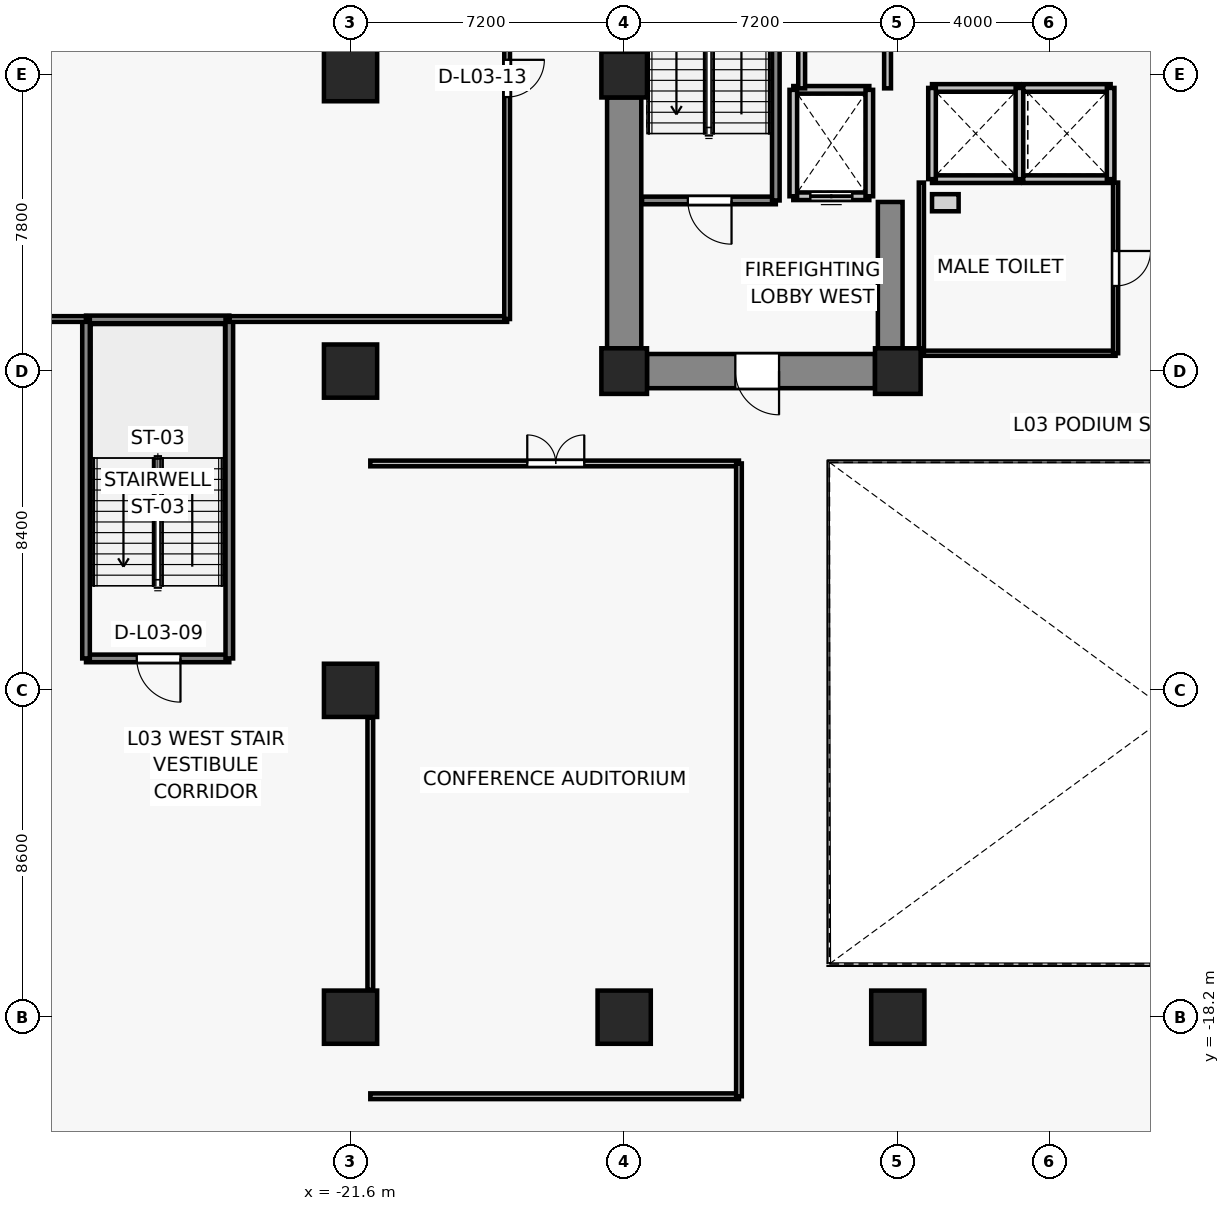
"""IFC4 building model, lengths in metres.
Left out: names, types, materials, properties, quantities, classifications, styles, units other than length and angle.
Written with IfcOpenShell. Run it as: python <this file> out.ifc"""

import sys

from ifc_helpers import new_model, si_unit, direction, frame, frame_2d, origin, origin_2d, place, context, subcontext, project, spatial, rectangle, extrude, source, transform, mapped, element, fill, save


model = new_model("IFC4")
c1 = context("Model", 3, precision=1e-05, world=origin(), true_north=direction((0.0, 1.0)))
c2 = subcontext(c1, "Body", "Model", "MODEL_VIEW")
j1 = project(units=[si_unit("LENGTHUNIT", "METRE"), si_unit("PLANEANGLEUNIT", "RADIAN")], contexts=[c1])
p1 = place(None, origin())
s1 = spatial("IfcSite", under=j1, at=p1, CompositionType="ELEMENT")
p2 = place(p1, origin())
s2 = spatial("IfcBuilding", under=s1, at=p2, CompositionType="ELEMENT")
p3 = place(p2, frame((0.0, 0.0, 13.8)))
s3 = spatial("IfcBuildingStorey", under=s2, at=p3, CompositionType="ELEMENT", Elevation=13.8)
for number, where, z_axis, x_axis in (
    (1, (-14.4, -1.2, 0.0), (0.0, 0.0, 1.0), (1.0, 0.0, 0.0)),
    (2, (-7.2, -1.2, 0.0), (0.0, 0.0, 1.0), (1.0, 0.0, 0.0)),
    (3, (-14.4, 6.6, 0.0), (0.0, 0.0, 1.0), (1.0, 0.0, 0.0)),
):
    element("IfcColumn", number, at=place(p3, frame(where, z_axis=z_axis, x_axis=x_axis)), inside=s3, PredefinedType="COLUMN", context=c2, shape_type="SweptSolid", body=[
        extrude(rectangle(XDim=1.2, YDim=1.2, at=origin_2d()), origin(), (0.0, 0.0, 1.0), 4.4),
    ])
for number, where, z_axis, x_axis in (
    (4, (-21.6, -18.2, 0.0), (0.0, 0.0, 1.0), (1.0, 0.0, 0.0)),
    (5, (-14.4, -18.2, 0.0), (0.0, 0.0, 1.0), (1.0, 0.0, 0.0)),
    (6, (-7.2, -18.2, 0.0), (0.0, 0.0, 1.0), (1.0, 0.0, 0.0)),
    (7, (-21.6, -9.6, 0.0), (0.0, 0.0, 1.0), (1.0, 0.0, 0.0)),
    (8, (-21.6, -1.2, 0.0), (0.0, 0.0, 1.0), (1.0, 0.0, 0.0)),
    (9, (-21.6, 6.6, 0.0), (0.0, 0.0, 1.0), (1.0, 0.0, 0.0)),
):
    element("IfcColumn", number, at=place(p3, frame(where, z_axis=z_axis, x_axis=x_axis)), inside=s3, PredefinedType="COLUMN", context=c2, shape_type="SweptSolid", body=[
        extrude(rectangle(XDim=1.4, YDim=1.4, at=origin_2d()), origin(), (0.0, 0.0, 1.0), 4.4),
    ])
p4 = place(p3, frame((-14.4, -0.6, 0.0), z_axis=(0.0, 0.0, 1.0), x_axis=(0.0, 1.0, 0.0)))
e10 = element("IfcWall", 10, at=p4, inside=s3, PredefinedType="SHEAR", context=c2, shape_type="SweptSolid", body=[
    extrude(rectangle(XDim=6.6, YDim=0.9, at=frame_2d((3.3, 0.0))), origin(), (0.0, 0.0, 1.0), 4.1),
])
p5 = place(p3, frame((-7.8, -1.2, 0.0), z_axis=(0.0, 0.0, 1.0), x_axis=(-1.0, 0.0, 0.0)))
e11 = element("IfcWall", 11, at=p5, inside=s3, PredefinedType="SHEAR", context=c2, shape_type="SweptSolid", body=[
    extrude(rectangle(XDim=6.0, YDim=0.9, at=frame_2d((3.0, 0.0))), origin(), (0.0, 0.0, 1.0), 4.1),
])
p6 = place(p5, frame((2.525, 0.0, 0.0)))
e12 = element("IfcOpeningElement", 12, at=p6, cuts=e11, PredefinedType="OPENING", context=c2, shape_type="SweptSolid", body=[
    extrude(rectangle(XDim=1.15, YDim=2.15, at=frame_2d((0.575, 1.075))), frame((0.0, 0.46, 0.0), z_axis=(0.0, -1.0, 0.0), x_axis=(1.0, 0.0, 0.0)), (0.0, 0.0, 1.0), 0.92),
])
p7 = place(p3, frame((-7.4, -0.75, 0.0), z_axis=(0.0, 0.0, 1.0), x_axis=(0.0, 1.0, 0.0)))
e13 = element("IfcWall", 13, at=p7, inside=s3, PredefinedType="SHEAR", context=c2, shape_type="SweptSolid", body=[
    extrude(rectangle(XDim=4.0, YDim=0.65, at=frame_2d((2.0, 0.0))), origin(), (0.0, 0.0, 1.0), 4.1),
])
p8 = place(p3, frame((-7.95, 3.4, 0.0), z_axis=(0.0, 0.0, 1.0), x_axis=(-1.0, 0.0, 0.0)))
e14 = element("IfcWall", 14, at=p8, inside=s3, PredefinedType="SOLIDWALL", context=c2, shape_type="SweptSolid", body=[
    extrude(rectangle(XDim=2.0, YDim=0.2, at=frame_2d((1.0, 0.0))), origin(), (0.0, 0.0, 1.0), 4.1),
])
p9 = place(p8, frame((0.45, 0.0, 0.0)))
e15 = element("IfcOpeningElement", 15, at=p9, cuts=e14, PredefinedType="OPENING", context=c2, shape_type="SweptSolid", body=[
    extrude(rectangle(XDim=1.1, YDim=2.2, at=frame_2d((0.55, 1.1))), frame((0.0, 0.11, 0.0), z_axis=(0.0, -1.0, 0.0), x_axis=(1.0, 0.0, 0.0)), (0.0, 0.0, 1.0), 0.22),
])
p10 = place(p3, frame((-9.95, 6.2, 0.0), z_axis=(0.0, 0.0, 1.0), x_axis=(1.0, 0.0, 0.0)))
e16 = element("IfcWall", 16, at=p10, inside=s3, PredefinedType="SOLIDWALL", context=c2, shape_type="SweptSolid", body=[
    extrude(rectangle(XDim=2.0, YDim=0.2, at=frame_2d((1.0, 0.0))), origin(), (0.0, 0.0, 1.0), 4.1),
])
for number, where, z_axis, x_axis in (
    (17, (-9.95, 3.4, 0.0), (0.0, 0.0, 1.0), (0.0, 1.0, 0.0)),
    (18, (-7.95, 6.2, 0.0), (0.0, 0.0, 1.0), (0.0, -1.0, 0.0)),
):
    element("IfcWall", number, at=place(p3, frame(where, z_axis=z_axis, x_axis=x_axis)), inside=s3, PredefinedType="SOLIDWALL", context=c2, shape_type="SweptSolid", body=[
        extrude(rectangle(XDim=2.8, YDim=0.2, at=frame_2d((1.4, 0.0))), origin(), (0.0, 0.0, 1.0), 4.1),
    ])
for number, where, z_axis, x_axis in (
    (19, (-4.0, 3.85, 0.0), (0.0, 0.0, 1.0), (-1.0, 0.0, 0.0)),
    (20, (-6.3, 6.25, 0.0), (0.0, 0.0, 1.0), (1.0, 0.0, 0.0)),
):
    element("IfcWall", number, at=place(p3, frame(where, z_axis=z_axis, x_axis=x_axis)), inside=s3, PredefinedType="SOLIDWALL", context=c2, shape_type="SweptSolid", body=[
        extrude(rectangle(XDim=2.3, YDim=0.2, at=frame_2d((1.15, 0.0))), origin(), (0.0, 0.0, 1.0), 4.1),
    ])
for number, where, z_axis, x_axis in (
    (21, (-6.3, 3.85, 0.0), (0.0, 0.0, 1.0), (0.0, 1.0, 0.0)),
    (22, (-4.0, 6.25, 0.0), (0.0, 0.0, 1.0), (0.0, -1.0, 0.0)),
):
    element("IfcWall", number, at=place(p3, frame(where, z_axis=z_axis, x_axis=x_axis)), inside=s3, PredefinedType="SOLIDWALL", context=c2, shape_type="SweptSolid", body=[
        extrude(rectangle(XDim=2.4, YDim=0.2, at=frame_2d((1.2, 0.0))), origin(), (0.0, 0.0, 1.0), 4.1),
    ])
for number, where, z_axis, x_axis in (
    (23, (-1.6, 3.85, 0.0), (0.0, 0.0, 1.0), (-1.0, 0.0, 0.0)),
    (24, (-3.9, 6.25, 0.0), (0.0, 0.0, 1.0), (1.0, 0.0, 0.0)),
):
    element("IfcWall", number, at=place(p3, frame(where, z_axis=z_axis, x_axis=x_axis)), inside=s3, PredefinedType="SOLIDWALL", context=c2, shape_type="SweptSolid", body=[
        extrude(rectangle(XDim=2.3, YDim=0.2, at=frame_2d((1.15, 0.0))), origin(), (0.0, 0.0, 1.0), 4.1),
    ])
p11 = place(p3, frame((-1.6, 6.25, 0.0), z_axis=(0.0, 0.0, 1.0), x_axis=(0.0, -1.0, 0.0)))
e25 = element("IfcWall", 25, at=p11, inside=s3, PredefinedType="SOLIDWALL", context=c2, shape_type="SweptSolid", body=[
    extrude(rectangle(XDim=2.4, YDim=0.2, at=frame_2d((1.2, 0.0))), origin(), (0.0, 0.0, 1.0), 4.1),
])
p12 = place(p3, frame((-10.41, 3.29, 0.0), z_axis=(0.0, 0.0, 1.0), x_axis=(-1.0, 0.0, 0.0)))
e26 = element("IfcWall", 26, at=p12, inside=s3, PredefinedType="SOLIDWALL", context=c2, shape_type="SweptSolid", body=[
    extrude(rectangle(XDim=3.52, YDim=0.2, at=frame_2d((1.76, 0.0))), origin(), (0.0, 0.0, 1.0), 4.1),
])
p13 = place(p12, frame((1.165, 0.0, 0.0)))
e27 = element("IfcOpeningElement", 27, at=p13, cuts=e26, PredefinedType="OPENING", context=c2, shape_type="SweptSolid", body=[
    extrude(rectangle(XDim=1.15, YDim=2.15, at=frame_2d((0.575, 1.075))), frame((0.0, 0.11, 0.0), z_axis=(0.0, -1.0, 0.0), x_axis=(1.0, 0.0, 0.0)), (0.0, 0.0, 1.0), 0.22),
])
p14 = place(p3, frame((-10.41, 12.13, 0.0), z_axis=(0.0, 0.0, 1.0), x_axis=(0.0, -1.0, 0.0)))
e28 = element("IfcWall", 28, at=p14, inside=s3, PredefinedType="SOLIDWALL", context=c2, shape_type="SweptSolid", body=[
    extrude(rectangle(XDim=8.84, YDim=0.2, at=frame_2d((4.42, 0.0))), origin(), (0.0, 0.0, 1.0), 4.1),
])
p15 = place(p3, frame((-9.73, 6.24, 0.0), z_axis=(0.0, 0.0, 1.0), x_axis=(0.0, 1.0, 0.0)))
e29 = element("IfcWall", 29, at=p15, inside=s3, PredefinedType="PARTITIONING", context=c2, shape_type="SweptSolid", body=[
    extrude(rectangle(XDim=1.09, YDim=0.18, at=frame_2d((0.545, 0.0))), origin(), (0.0, 0.0, 1.0), 4.1),
])
p16 = place(p3, frame((-7.47, 7.33, 0.0), z_axis=(0.0, 0.0, 1.0), x_axis=(0.0, -1.0, 0.0)))
e30 = element("IfcWall", 30, at=p16, inside=s3, PredefinedType="PARTITIONING", context=c2, shape_type="SweptSolid", body=[
    extrude(rectangle(XDim=1.09, YDim=0.18, at=frame_2d((0.545, 0.0))), origin(), (0.0, 0.0, 1.0), 3.19),
])
p17 = place(p3, frame((-1.47, -0.73, 0.0), z_axis=(0.0, 0.0, 1.0), x_axis=(-1.0, 0.0, 0.0)))
e31 = element("IfcWall", 31, at=p17, inside=s3, PredefinedType="PARTITIONING", context=c2, shape_type="SweptSolid", body=[
    extrude(rectangle(XDim=5.11, YDim=0.135, at=frame_2d((2.555, 0.0))), origin(), (0.0, 0.0, 1.0), 4.1),
])
p18 = place(p3, frame((-6.58, -0.73, 0.0), z_axis=(0.0, 0.0, 1.0), x_axis=(0.0, 1.0, 0.0)))
e32 = element("IfcWall", 32, at=p18, inside=s3, PredefinedType="PARTITIONING", context=c2, shape_type="SweptSolid", body=[
    extrude(rectangle(XDim=4.49, YDim=0.135, at=frame_2d((2.245, 0.0))), origin(), (0.0, 0.0, 1.0), 3.473),
])
p19 = place(p3, frame((-1.47, 3.76, 0.0), z_axis=(0.0, 0.0, 1.0), x_axis=(0.0, -1.0, 0.0)))
e33 = element("IfcWall", 33, at=p19, inside=s3, PredefinedType="PARTITIONING", context=c2, shape_type="SweptSolid", body=[
    extrude(rectangle(XDim=4.49, YDim=0.135, at=frame_2d((2.245, 0.0))), origin(), (0.0, 0.0, 1.0), 3.473),
])
p20 = place(p19, frame((1.8, 0.0, 0.0)))
e34 = element("IfcOpeningElement", 34, at=p20, cuts=e33, PredefinedType="OPENING", context=c2, shape_type="SweptSolid", body=[
    extrude(rectangle(XDim=0.92, YDim=2.1, at=frame_2d((0.46, 1.05))), frame((0.0, 0.077, 0.0), z_axis=(0.0, -1.0, 0.0), x_axis=(1.0, 0.0, 0.0)), (0.0, 0.0, 1.0), 0.155),
])
p21 = place(p3, frame((-24.79, -8.76, 0.0), z_axis=(0.0, 0.0, 1.0), x_axis=(-1.0, 0.0, 0.0)))
e35 = element("IfcWall", 35, at=p21, inside=s3, PredefinedType="SOLIDWALL", context=c2, shape_type="SweptSolid", body=[
    extrude(rectangle(XDim=3.77, YDim=0.2, at=frame_2d((1.885, 0.0))), origin(), (0.0, 0.0, 1.0), 4.1),
])
p22 = place(p21, frame((1.285, 0.0, 0.0)))
e36 = element("IfcOpeningElement", 36, at=p22, cuts=e35, PredefinedType="OPENING", context=c2, shape_type="SweptSolid", body=[
    extrude(rectangle(XDim=1.15, YDim=2.15, at=frame_2d((0.575, 1.075))), frame((0.0, 0.11, 0.0), z_axis=(0.0, -1.0, 0.0), x_axis=(1.0, 0.0, 0.0)), (0.0, 0.0, 1.0), 0.22),
])
p23 = place(p3, frame((-28.56, 0.16, 0.0), z_axis=(0.0, 0.0, 1.0), x_axis=(1.0, 0.0, 0.0)))
e37 = element("IfcWall", 37, at=p23, inside=s3, PredefinedType="SOLIDWALL", context=c2, shape_type="SweptSolid", body=[
    extrude(rectangle(XDim=3.77, YDim=0.2, at=frame_2d((1.885, 0.0))), origin(), (0.0, 0.0, 1.0), 4.1),
])
for number, where, z_axis, x_axis in (
    (38, (-28.56, -8.76, 0.0), (0.0, 0.0, 1.0), (0.0, 1.0, 0.0)),
    (39, (-24.79, 0.16, 0.0), (0.0, 0.0, 1.0), (0.0, -1.0, 0.0)),
):
    element("IfcWall", number, at=place(p3, frame(where, z_axis=z_axis, x_axis=x_axis)), inside=s3, PredefinedType="SOLIDWALL", context=c2, shape_type="SweptSolid", body=[
        extrude(rectangle(XDim=8.92, YDim=0.2, at=frame_2d((4.46, 0.0))), origin(), (0.0, 0.0, 1.0), 4.1),
    ])
p24 = place(p3, frame((-11.38, -20.28, 0.0), z_axis=(0.0, 0.0, 1.0), x_axis=(-1.0, 0.0, 0.0)))
e40 = element("IfcWall", 40, at=p24, inside=s3, PredefinedType="PARTITIONING", context=c2, shape_type="SweptSolid", body=[
    extrude(rectangle(XDim=9.7, YDim=0.15, at=frame_2d((4.85, 0.0))), origin(), (0.0, 0.0, 1.0), 4.1),
])
p25 = place(p3, frame((-21.08, -3.63, 0.0), z_axis=(0.0, 0.0, 1.0), x_axis=(1.0, 0.0, 0.0)))
e41 = element("IfcWall", 41, at=p25, inside=s3, PredefinedType="PARTITIONING", context=c2, shape_type="SweptSolid", body=[
    extrude(rectangle(XDim=9.7, YDim=0.15, at=frame_2d((4.85, 0.0))), origin(), (0.0, 0.0, 1.0), 3.239),
])
p26 = place(p25, frame((4.13, 0.0, 0.0)))
e42 = element("IfcOpeningElement", 42, at=p26, cuts=e41, PredefinedType="OPENING", context=c2, shape_type="SweptSolid", body=[
    extrude(rectangle(XDim=1.5, YDim=2.2, at=frame_2d((0.75, 1.1))), frame((0.0, 0.085, 0.0), z_axis=(0.0, -1.0, 0.0), x_axis=(1.0, 0.0, 0.0)), (0.0, 0.0, 1.0), 0.17),
])
p27 = place(p3, frame((-21.08, -17.48, 0.0), z_axis=(0.0, 0.0, 1.0), x_axis=(0.0, 1.0, 0.0)))
e43 = element("IfcWall", 43, at=p27, inside=s3, PredefinedType="PARTITIONING", context=c2, shape_type="SweptSolid", body=[
    extrude(rectangle(XDim=7.16, YDim=0.15, at=frame_2d((3.58, 0.0))), origin(), (0.0, 0.0, 1.0), 3.29),
])
p28 = place(p3, frame((-11.38, -3.63, 0.0), z_axis=(0.0, 0.0, 1.0), x_axis=(0.0, -1.0, 0.0)))
e44 = element("IfcWall", 44, at=p28, inside=s3, PredefinedType="PARTITIONING", context=c2, shape_type="SweptSolid", body=[
    extrude(rectangle(XDim=16.65, YDim=0.15, at=frame_2d((8.325, 0.0))), origin(), (0.0, 0.0, 1.0), 3.19),
])
p29 = place(p3, frame((-28.56, 0.17, 0.0), z_axis=(0.0, 0.0, 1.0), x_axis=(-1.0, 0.0, 0.0)))
e45 = element("IfcWall", 45, at=p29, inside=s3, PredefinedType="PARTITIONING", context=c2, shape_type="SweptSolid", body=[
    extrude(rectangle(XDim=5.32, YDim=0.15, at=frame_2d((2.66, 0.0))), origin(), (0.0, 0.0, 1.0), 3.19),
])
p30 = place(p3, frame((-17.48, 0.17, 0.0), z_axis=(0.0, 0.0, 1.0), x_axis=(-1.0, 0.0, 0.0)))
e46 = element("IfcWall", 46, at=p30, inside=s3, PredefinedType="PARTITIONING", context=c2, shape_type="SweptSolid", body=[
    extrude(rectangle(XDim=7.31, YDim=0.15, at=frame_2d((3.655, 0.0))), origin(), (0.0, 0.0, 1.0), 3.19),
])
p31 = place(p3, frame((-17.48, 13.48, 0.0), z_axis=(0.0, 0.0, 1.0), x_axis=(0.0, -1.0, 0.0)))
e47 = element("IfcWall", 47, at=p31, inside=s3, PredefinedType="PARTITIONING", context=c2, shape_type="SweptSolid", body=[
    extrude(rectangle(XDim=13.31, YDim=0.15, at=frame_2d((6.655, 0.0))), origin(), (0.0, 0.0, 1.0), 3.19),
])
p32 = place(p31, frame((6.49, 0.0, 0.0)))
e48 = element("IfcOpeningElement", 48, at=p32, cuts=e47, PredefinedType="OPENING", context=c2, shape_type="SweptSolid", body=[
    extrude(rectangle(XDim=0.98, YDim=2.15, at=frame_2d((0.49, 1.075))), frame((0.0, 0.085, 0.0), z_axis=(0.0, -1.0, 0.0), x_axis=(1.0, 0.0, 0.0)), (0.0, 0.0, 1.0), 0.17),
])
m1 = source(origin(), c2, "Body", "SweptSolid", [
    extrude(rectangle(XDim=1.1, YDim=2.2, at=frame_2d((0.55, 1.1))), frame((0.0, 0.025, 0.0), z_axis=(0.0, -1.0, 0.0), x_axis=(1.0, 0.0, 0.0)), (0.0, 0.0, 1.0), 0.05),
])
p33 = place(p9, origin())
e49 = element("IfcDoor", 49, at=p33, inside=s3, OperationType="DOUBLE_DOOR_SLIDING", PredefinedType="DOOR", context=c2, shape_type="MappedRepresentation", body=[
    mapped(m1, transform((0.0, 0.0, 0.0), x_axis=(1.0, 0.0, 0.0), y_axis=(0.0, 1.0, 0.0), z_axis=(0.0, 0.0, 1.0), scale=1.0)),
])
fill(e15, e49)
m2 = source(origin(), c2, "Body", "SweptSolid", [
    extrude(rectangle(XDim=1.15, YDim=2.15, at=frame_2d((0.575, 1.075))), frame((0.0, 0.025, 0.0), z_axis=(0.0, -1.0, 0.0), x_axis=(1.0, 0.0, 0.0)), (0.0, 0.0, 1.0), 0.05),
])
p34 = place(p13, origin())
e50 = element("IfcDoor", 50, at=p34, inside=s3, OperationType="SINGLE_SWING_LEFT", PredefinedType="DOOR", context=c2, shape_type="MappedRepresentation", body=[
    mapped(m2, transform((0.0, 0.0, 0.0), x_axis=(1.0, 0.0, 0.0), y_axis=(0.0, 1.0, 0.0), z_axis=(0.0, 0.0, 1.0), scale=1.0)),
])
fill(e27, e50)
p35 = place(p6, origin())
e51 = element("IfcDoor", 51, at=p35, inside=s3, OperationType="SINGLE_SWING_LEFT", PredefinedType="DOOR", context=c2, shape_type="MappedRepresentation", body=[
    mapped(m2, transform((0.0, 0.0, 0.0), x_axis=(1.0, 0.0, 0.0), y_axis=(0.0, 1.0, 0.0), z_axis=(0.0, 0.0, 1.0), scale=1.0)),
])
fill(e12, e51)
m3 = source(origin(), c2, "Body", "SweptSolid", [
    extrude(rectangle(XDim=0.92, YDim=2.1, at=frame_2d((0.46, 1.05))), frame((0.0, 0.025, 0.0), z_axis=(0.0, -1.0, 0.0), x_axis=(1.0, 0.0, 0.0)), (0.0, 0.0, 1.0), 0.05),
])
p36 = place(p20, origin())
e52 = element("IfcDoor", 52, at=p36, inside=s3, OperationType="SINGLE_SWING_LEFT", PredefinedType="DOOR", context=c2, shape_type="MappedRepresentation", body=[
    mapped(m3, transform((0.0, 0.0, 0.0), x_axis=(1.0, 0.0, 0.0), y_axis=(0.0, 1.0, 0.0), z_axis=(0.0, 0.0, 1.0), scale=1.0)),
])
fill(e34, e52)
p37 = place(p22, origin())
e53 = element("IfcDoor", 53, at=p37, inside=s3, OperationType="SINGLE_SWING_LEFT", PredefinedType="DOOR", context=c2, shape_type="MappedRepresentation", body=[
    mapped(m2, transform((0.0, 0.0, 0.0), x_axis=(1.0, 0.0, 0.0), y_axis=(0.0, 1.0, 0.0), z_axis=(0.0, 0.0, 1.0), scale=1.0)),
])
fill(e36, e53)
m4 = source(origin(), c2, "Body", "SweptSolid", [
    extrude(rectangle(XDim=1.5, YDim=2.2, at=frame_2d((0.75, 1.1))), frame((0.0, 0.025, 0.0), z_axis=(0.0, -1.0, 0.0), x_axis=(1.0, 0.0, 0.0)), (0.0, 0.0, 1.0), 0.05),
])
p38 = place(p26, origin())
e54 = element("IfcDoor", 54, at=p38, inside=s3, OperationType="DOUBLE_DOOR_SINGLE_SWING", PredefinedType="DOOR", context=c2, shape_type="MappedRepresentation", body=[
    mapped(m4, transform((0.0, 0.0, 0.0), x_axis=(1.0, 0.0, 0.0), y_axis=(0.0, 1.0, 0.0), z_axis=(0.0, 0.0, 1.0), scale=1.0)),
])
fill(e42, e54)
m5 = source(origin(), c2, "Body", "SweptSolid", [
    extrude(rectangle(XDim=0.98, YDim=2.15, at=frame_2d((0.49, 1.075))), frame((0.0, 0.025, 0.0), z_axis=(0.0, -1.0, 0.0), x_axis=(1.0, 0.0, 0.0)), (0.0, 0.0, 1.0), 0.05),
])
p39 = place(p32, origin())
e55 = element("IfcDoor", 55, at=p39, inside=s3, OperationType="SINGLE_SWING_LEFT", PredefinedType="DOOR", context=c2, shape_type="MappedRepresentation", body=[
    mapped(m5, transform((0.0, 0.0, 0.0), x_axis=(1.0, 0.0, 0.0), y_axis=(0.0, 1.0, 0.0), z_axis=(0.0, 0.0, 1.0), scale=1.0)),
])
fill(e48, e55)
save(model, sys.argv[1])
